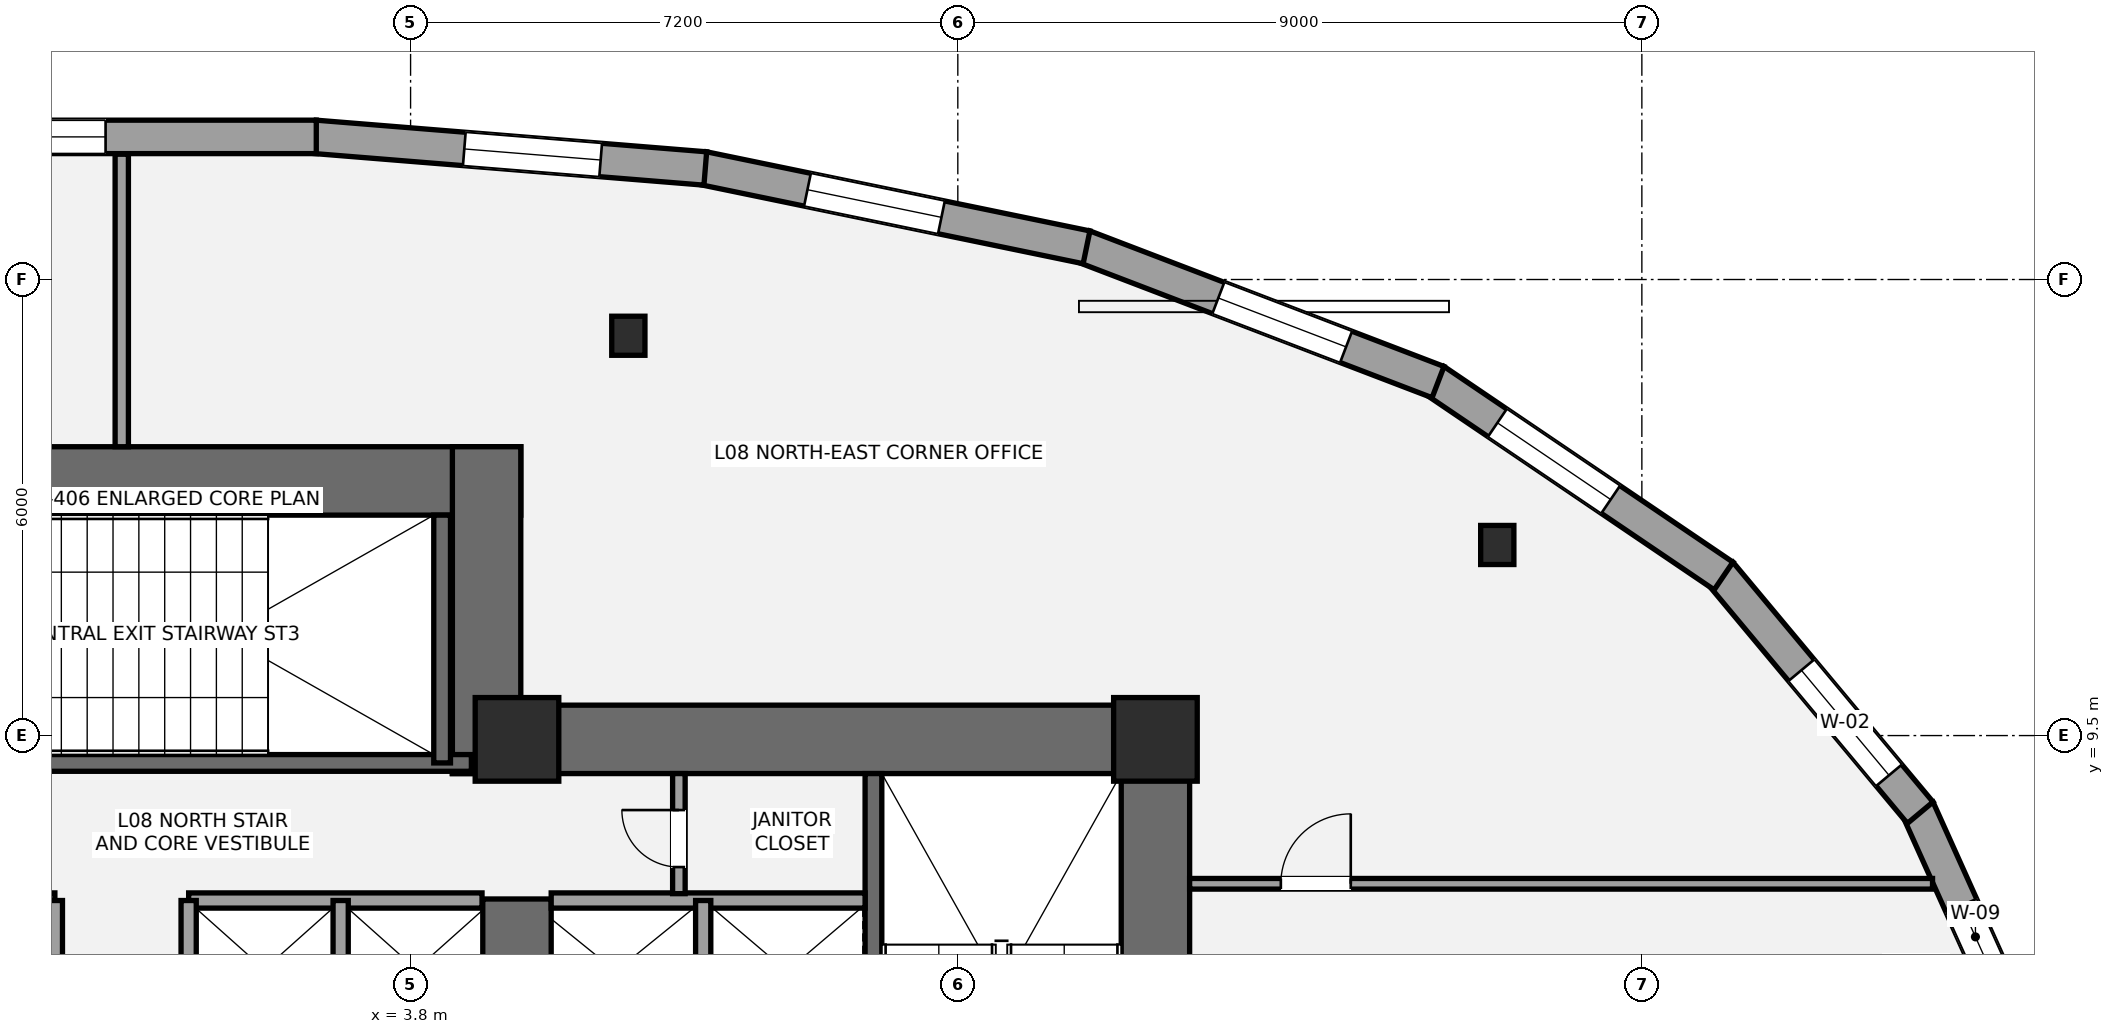
"""IFC4 building model, lengths in metres.
Left out: names, types, materials, properties, quantities, classifications, styles, units other than length and angle.
Written with IfcOpenShell. Run it as: python <this file> out.ifc"""

import sys

from ifc_helpers import new_model, si_unit, direction, frame, frame_2d, origin, origin_2d, place, context, subcontext, project, spatial, rectangle, i_section, extrude, element, fill, save


model = new_model("IFC4")
c1 = context("Model", 3, precision=1e-05, world=origin(), true_north=direction((0.0, 1.0)))
c2 = subcontext(c1, "Body", "Model", "MODEL_VIEW")
j1 = project(units=[si_unit("LENGTHUNIT", "METRE"), si_unit("PLANEANGLEUNIT", "RADIAN")], contexts=[c1])
p1 = place(None, origin())
s1 = spatial("IfcSite", under=j1, at=p1, CompositionType="ELEMENT")
p2 = place(p1, origin())
s2 = spatial("IfcBuilding", under=s1, at=p2, CompositionType="ELEMENT")
p3 = place(p2, frame((0.0, 0.0, 34.2)))
s3 = spatial("IfcBuildingStorey", under=s2, at=p3, CompositionType="ELEMENT", Elevation=34.2)
p4 = place(p3, frame((13.6, 0.95, 0.0), z_axis=(0.0, 0.0, 1.0), x_axis=(0.0, 1.0, 0.0)))
e1 = element("IfcWall", 1, at=p4, inside=s3, PredefinedType="SHEAR", context=c2, shape_type="SweptSolid", body=[
    extrude(rectangle(XDim=8.95, YDim=0.9, at=frame_2d((4.475, 0.0))), origin(), (0.0, 0.0, 1.0), 3.6),
])
p5 = place(p3, frame((4.35, 9.45, 0.0), z_axis=(0.0, 0.0, 1.0), x_axis=(1.0, 0.0, 0.0)))
e2 = element("IfcWall", 2, at=p5, inside=s3, PredefinedType="SHEAR", context=c2, shape_type="SweptSolid", body=[
    extrude(rectangle(XDim=9.7, YDim=0.9, at=frame_2d((4.85, 0.0))), origin(), (0.0, 0.0, 1.0), 3.6),
])
p6 = place(p3, frame((5.2, 5.35, 0.0), z_axis=(0.0, 0.0, 1.0), x_axis=(0.0, 1.0, 0.0)))
e3 = element("IfcWall", 3, at=p6, inside=s3, PredefinedType="SHEAR", context=c2, shape_type="SweptSolid", body=[
    extrude(rectangle(XDim=2.0, YDim=0.9, at=frame_2d((1.0, 0.0))), origin(), (0.0, 0.0, 1.0), 3.6),
])
p7 = place(p3, frame((9.89, 1.85, 0.0), z_axis=(0.0, 0.0, 1.0), x_axis=(0.0, 1.0, 0.0)))
e4 = element("IfcWall", 4, at=p7, inside=s3, PredefinedType="SHEAR", context=c2, shape_type="SweptSolid", body=[
    extrude(rectangle(XDim=7.15, YDim=0.22, at=frame_2d((3.575, 0.0))), origin(), (0.0, 0.0, 1.0), 3.6),
])
p8 = place(p3, frame((-5.25, 12.85, 0.0), z_axis=(0.0, 0.0, 1.0), x_axis=(1.0, 0.0, 0.0)))
e5 = element("IfcWall", 5, at=p8, inside=s3, PredefinedType="SHEAR", context=c2, shape_type="SweptSolid", body=[
    extrude(rectangle(XDim=10.5, YDim=0.9, at=frame_2d((5.25, 0.0))), origin(), (0.0, 0.0, 1.0), 3.6),
])
p9 = place(p3, frame((4.8, 9.0, 0.0), z_axis=(0.0, 0.0, 1.0), x_axis=(0.0, 1.0, 0.0)))
e6 = element("IfcWall", 6, at=p9, inside=s3, PredefinedType="SHEAR", context=c2, shape_type="SweptSolid", body=[
    extrude(rectangle(XDim=4.3, YDim=0.9, at=frame_2d((2.15, 0.0))), origin(), (0.0, 0.0, 1.0), 3.6),
])
p10 = place(p3, frame((-4.7, 9.14, 0.0), z_axis=(0.0, 0.0, 1.0), x_axis=(1.0, 0.0, 0.0)))
e7 = element("IfcWall", 7, at=p10, inside=s3, PredefinedType="SHEAR", context=c2, shape_type="SweptSolid", body=[
    extrude(rectangle(XDim=9.3, YDim=0.22, at=frame_2d((4.65, 0.0))), origin(), (0.0, 0.0, 1.0), 3.6),
])
p11 = place(p10, frame((1.15, 0.0, 0.0)))
e8 = element("IfcOpeningElement", 8, at=p11, cuts=e7, PredefinedType="OPENING", context=c2, shape_type="SweptSolid", body=[
    extrude(rectangle(XDim=1.05, YDim=2.15, at=frame_2d((0.525, 1.075))), frame((0.0, 0.12, 0.0), z_axis=(0.0, -1.0, 0.0), x_axis=(1.0, 0.0, 0.0)), (0.0, 0.0, 1.0), 0.24),
])
p12 = place(p3, frame((4.215, 9.14, 0.0), z_axis=(0.0, 0.0, 1.0), x_axis=(0.0, 1.0, 0.0)))
e9 = element("IfcWall", 9, at=p12, inside=s3, PredefinedType="SHEAR", context=c2, shape_type="SweptSolid", body=[
    extrude(rectangle(XDim=3.26, YDim=0.22, at=frame_2d((1.63, 0.0))), origin(), (0.0, 0.0, 1.0), 3.6),
])
for number, where, z_axis, x_axis in (
    (10, (5.2, 9.45, 0.0), (0.0, 0.0, 1.0), (1.0, 0.0, 0.0)),
    (11, (13.6, 9.45, 0.0), (0.0, 0.0, 1.0), (1.0, 0.0, 0.0)),
):
    element("IfcColumn", number, at=place(p3, frame(where, z_axis=z_axis, x_axis=x_axis)), inside=s3, PredefinedType="COLUMN", context=c2, shape_type="SweptSolid", body=[
        extrude(rectangle(XDim=1.1, YDim=1.1, at=origin_2d()), origin(), (0.0, 0.0, 1.0), 3.6),
    ])
for number, where, z_axis, x_axis in (
    (12, (18.098, 12.007, 0.0), (0.0, 0.0, 1.0), (1.0, 0.0, 0.0)),
    (13, (6.665, 14.76, 0.0), (0.0, 0.0, 1.0), (1.0, 0.0, 0.0)),
):
    element("IfcColumn", number, at=place(p3, frame(where, z_axis=z_axis, x_axis=x_axis)), inside=s3, PredefinedType="COLUMN", context=c2, shape_type="SweptSolid", body=[
        extrude(i_section(OverallWidth=0.437, OverallDepth=0.514, WebThickness=0.061, FlangeThickness=0.097, at=origin_2d()), origin(), (0.0, 0.0, 1.0), 3.6),
    ])
p13 = place(p3, frame((23.631, 8.536, 0.0), z_axis=(0.0, 0.0, 1.0), x_axis=(0.410386362845, -0.911911746383, 0.0)))
e14 = element("IfcWall", 14, at=p13, inside=s3, PredefinedType="STANDARD", context=c2, shape_type="SweptSolid", body=[
    extrude(rectangle(XDim=3.745, YDim=0.44, at=frame_2d((1.873, 0.0))), origin(), (0.0, 0.0, 1.0), 2.533),
])
p14 = place(p13, frame((1.397, 0.0, 0.92)))
e15 = element("IfcOpeningElement", 15, at=p14, cuts=e14, PredefinedType="OPENING", context=c2, shape_type="SweptSolid", body=[
    extrude(rectangle(XDim=0.9, YDim=1.35, at=frame_2d((0.45, 0.675))), frame((0.0, 0.23, 0.0), z_axis=(0.0, -1.0, 0.0), x_axis=(1.0, 0.0, 0.0)), (0.0, 0.0, 1.0), 0.46),
])
p15 = place(p3, frame((21.029, 11.641, 0.0), z_axis=(0.0, 0.0, 1.0), x_axis=(0.64070435578, -0.767787684509, 0.0)))
e16 = element("IfcWall", 16, at=p15, inside=s3, PredefinedType="STANDARD", context=c2, shape_type="SweptSolid", body=[
    extrude(rectangle(XDim=4.109, YDim=0.44, at=frame_2d((2.055, 0.0))), origin(), (0.0, 0.0, 1.0), 2.533),
])
p16 = place(p15, frame((1.669, 0.0, 0.65)))
e17 = element("IfcOpeningElement", 17, at=p16, cuts=e16, PredefinedType="OPENING", context=c2, shape_type="SweptSolid", body=[
    extrude(rectangle(XDim=1.8, YDim=1.7, at=frame_2d((0.9, 0.85))), frame((0.0, 0.23, 0.0), z_axis=(0.0, -1.0, 0.0), x_axis=(1.0, 0.0, 0.0)), (0.0, 0.0, 1.0), 0.46),
])
p17 = place(p3, frame((17.274, 14.174, 0.0), z_axis=(0.0, 0.0, 1.0), x_axis=(0.828003115717, -0.560723497246, 0.0)))
e18 = element("IfcWall", 18, at=p17, inside=s3, PredefinedType="STANDARD", context=c2, shape_type="SweptSolid", body=[
    extrude(rectangle(XDim=4.591, YDim=0.44, at=frame_2d((2.295, 0.0))), origin(), (0.0, 0.0, 1.0), 2.529),
])
p18 = place(p17, frame((0.997, 0.0, 0.65)))
e19 = element("IfcOpeningElement", 19, at=p18, cuts=e18, PredefinedType="OPENING", context=c2, shape_type="SweptSolid", body=[
    extrude(rectangle(XDim=1.8, YDim=1.7, at=frame_2d((0.9, 0.85))), frame((0.0, 0.23, 0.0), z_axis=(0.0, -1.0, 0.0), x_axis=(1.0, 0.0, 0.0)), (0.0, 0.0, 1.0), 0.46),
])
p19 = place(p3, frame((12.659, 15.934, 0.0), z_axis=(0.0, 0.0, 1.0), x_axis=(0.933928375579, -0.357460192592, 0.0)))
e20 = element("IfcWall", 20, at=p19, inside=s3, PredefinedType="STANDARD", context=c2, shape_type="SweptSolid", body=[
    extrude(rectangle(XDim=4.989, YDim=0.44, at=frame_2d((2.494, 0.0))), origin(), (0.0, 0.0, 1.0), 2.529),
])
p20 = place(p19, frame((1.893, 0.0, 0.65)))
e21 = element("IfcOpeningElement", 21, at=p20, cuts=e20, PredefinedType="OPENING", context=c2, shape_type="SweptSolid", body=[
    extrude(rectangle(XDim=1.8, YDim=1.7, at=frame_2d((0.9, 0.85))), frame((0.0, 0.23, 0.0), z_axis=(0.0, -1.0, 0.0), x_axis=(1.0, 0.0, 0.0)), (0.0, 0.0, 1.0), 0.46),
])
p21 = place(p3, frame((7.651, 16.965, 0.0), z_axis=(0.0, 0.0, 1.0), x_axis=(0.979349207435, -0.202175987437, 0.0)))
e22 = element("IfcWall", 22, at=p21, inside=s3, PredefinedType="STANDARD", context=c2, shape_type="SweptSolid", body=[
    extrude(rectangle(XDim=5.149, YDim=0.44, at=frame_2d((2.575, 0.0))), origin(), (0.0, 0.0, 1.0), 2.533),
])
p22 = place(p21, frame((1.4, 0.0, 0.65)))
e23 = element("IfcOpeningElement", 23, at=p22, cuts=e22, PredefinedType="OPENING", context=c2, shape_type="SweptSolid", body=[
    extrude(rectangle(XDim=1.8, YDim=1.7, at=frame_2d((0.9, 0.85))), frame((0.0, 0.23, 0.0), z_axis=(0.0, -1.0, 0.0), x_axis=(1.0, 0.0, 0.0)), (0.0, 0.0, 1.0), 0.46),
])
p23 = place(p3, frame((2.541, 17.377, 0.0), z_axis=(0.0, 0.0, 1.0), x_axis=(0.996732038622, -0.080778977367, 0.0)))
e24 = element("IfcWall", 24, at=p23, inside=s3, PredefinedType="STANDARD", context=c2, shape_type="SweptSolid", body=[
    extrude(rectangle(XDim=5.153, YDim=0.44, at=frame_2d((2.577, 0.0))), origin(), (0.0, 0.0, 1.0), 2.533),
])
p24 = place(p23, frame((1.972, 0.0, 0.65)))
e25 = element("IfcOpeningElement", 25, at=p24, cuts=e24, PredefinedType="OPENING", context=c2, shape_type="SweptSolid", body=[
    extrude(rectangle(XDim=1.8, YDim=1.7, at=frame_2d((0.9, 0.85))), frame((0.0, 0.23, 0.0), z_axis=(0.0, -1.0, 0.0), x_axis=(1.0, 0.0, 0.0)), (0.0, 0.0, 1.0), 0.46),
])
p25 = place(p3, frame((-2.559, 17.376, 0.0), z_axis=(0.0, 0.0, 1.0), x_axis=(1.0, 0.0, 0.0)))
e26 = element("IfcWall", 26, at=p25, inside=s3, PredefinedType="STANDARD", context=c2, shape_type="SweptSolid", body=[
    extrude(rectangle(XDim=5.118, YDim=0.44, at=frame_2d((2.559, 0.0))), origin(), (0.0, 0.0, 1.0), 2.533),
])
p26 = place(p25, frame((0.546, 0.0, 0.65)))
e27 = element("IfcOpeningElement", 27, at=p26, cuts=e26, PredefinedType="OPENING", context=c2, shape_type="SweptSolid", body=[
    extrude(rectangle(XDim=1.8, YDim=1.7, at=frame_2d((0.9, 0.85))), frame((0.0, 0.23, 0.0), z_axis=(0.0, -1.0, 0.0), x_axis=(1.0, 0.0, 0.0)), (0.0, 0.0, 1.0), 0.46),
])
p27 = place(p3, frame((5.65, 7.33, 0.0), z_axis=(0.0, 0.0, 1.0), x_axis=(1.0, 0.0, 0.0)))
e28 = element("IfcWall", 28, at=p27, inside=s3, PredefinedType="SOLIDWALL", context=c2, shape_type="SweptSolid", body=[
    extrude(rectangle(XDim=4.13, YDim=0.2, at=frame_2d((2.065, 0.0))), origin(), (0.0, 0.0, 1.0), 3.4),
])
p28 = place(p3, frame((7.65, 5.47, 0.0), z_axis=(0.0, 0.0, 1.0), x_axis=(0.0, 1.0, 0.0)))
e29 = element("IfcWall", 29, at=p28, inside=s3, PredefinedType="SOLIDWALL", context=c2, shape_type="SweptSolid", body=[
    extrude(rectangle(XDim=1.86, YDim=0.2, at=frame_2d((0.93, 0.0))), origin(), (0.0, 0.0, 1.0), 3.4),
])
for number, where, z_axis, x_axis in (
    (30, (-4.74, 7.33, 0.0), (0.0, 0.0, 1.0), (1.0, 0.0, 0.0)),
    (31, (0.88, 7.33, 0.0), (0.0, 0.0, 1.0), (1.0, 0.0, 0.0)),
):
    element("IfcWall", number, at=place(p3, frame(where, z_axis=z_axis, x_axis=x_axis)), inside=s3, PredefinedType="SOLIDWALL", context=c2, shape_type="SweptSolid", body=[
        extrude(rectangle(XDim=3.86, YDim=0.2, at=frame_2d((1.93, 0.0))), origin(), (0.0, 0.0, 1.0), 3.4),
    ])
for number, where, z_axis, x_axis in (
    (32, (2.88, 5.52, 0.0), (0.0, 0.0, 1.0), (0.0, 1.0, 0.0)),
    (33, (-0.88, 5.52, 0.0), (0.0, 0.0, 1.0), (0.0, 1.0, 0.0)),
    (34, (0.88, 5.52, 0.0), (0.0, 0.0, 1.0), (0.0, 1.0, 0.0)),
):
    element("IfcWall", number, at=place(p3, frame(where, z_axis=z_axis, x_axis=x_axis)), inside=s3, PredefinedType="SOLIDWALL", context=c2, shape_type="SweptSolid", body=[
        extrude(rectangle(XDim=1.81, YDim=0.2, at=frame_2d((0.905, 0.0))), origin(), (0.0, 0.0, 1.0), 3.4),
    ])
p29 = place(p3, frame((7.33, 7.42, 0.0), z_axis=(0.0, 0.0, 1.0), x_axis=(0.0, 1.0, 0.0)))
e35 = element("IfcWall", 35, at=p29, inside=s3, PredefinedType="PARTITIONING", context=c2, shape_type="SweptSolid", body=[
    extrude(rectangle(XDim=1.58, YDim=0.165, at=frame_2d((0.79, 0.0))), origin(), (0.0, 0.0, 1.0), 3.4),
])
p30 = place(p29, frame((0.35, 0.0, 0.0)))
e36 = element("IfcOpeningElement", 36, at=p30, cuts=e35, PredefinedType="OPENING", context=c2, shape_type="SweptSolid", body=[
    extrude(rectangle(XDim=0.75, YDim=2.1, at=frame_2d((0.375, 1.05))), frame((0.0, 0.093, 0.0), z_axis=(0.0, -1.0, 0.0), x_axis=(1.0, 0.0, 0.0)), (0.0, 0.0, 1.0), 0.185),
])
p31 = place(p3, frame((14.05, 7.55, 0.0), z_axis=(0.0, 0.0, 1.0), x_axis=(1.0, 0.0, 0.0)))
e37 = element("IfcWall", 37, at=p31, inside=s3, PredefinedType="PARTITIONING", context=c2, shape_type="SweptSolid", body=[
    extrude(rectangle(XDim=9.774, YDim=0.14, at=frame_2d((4.887, 0.0))), origin(), (0.0, 0.0, 1.0), 2.853),
])
p32 = place(p31, frame((1.2, 0.0, 0.0)))
e38 = element("IfcOpeningElement", 38, at=p32, cuts=e37, PredefinedType="OPENING", context=c2, shape_type="SweptSolid", body=[
    extrude(rectangle(XDim=0.92, YDim=2.15, at=frame_2d((0.46, 1.075))), frame((0.0, 0.08, 0.0), z_axis=(0.0, -1.0, 0.0), x_axis=(1.0, 0.0, 0.0)), (0.0, 0.0, 1.0), 0.16),
])
p33 = place(p3, frame((0.0, 13.3, 0.0), z_axis=(0.0, 0.0, 1.0), x_axis=(0.0, 1.0, 0.0)))
e39 = element("IfcWall", 39, at=p33, inside=s3, PredefinedType="PARTITIONING", context=c2, shape_type="SweptSolid", body=[
    extrude(rectangle(XDim=3.848, YDim=0.175, at=frame_2d((1.924, 0.0))), origin(), (0.0, 0.0, 1.0), 3.4),
])
p34 = place(p14, origin())
e40 = element("IfcWindow", 40, at=p34, inside=s3, PartitioningType="SINGLE_PANEL", PredefinedType="WINDOW", context=c2, shape_type="SweptSolid", body=[
    extrude(rectangle(XDim=0.9, YDim=1.35, at=frame_2d((0.45, 0.675))), frame((0.0, -0.01, 0.0), z_axis=(0.0, -1.0, 0.0), x_axis=(1.0, 0.0, 0.0)), (0.0, 0.0, 1.0), 0.06),
])
fill(e15, e40)
p35 = place(p16, origin())
e41 = element("IfcWindow", 41, at=p35, inside=s3, PartitioningType="SINGLE_PANEL", PredefinedType="WINDOW", context=c2, shape_type="SweptSolid", body=[
    extrude(rectangle(XDim=1.8, YDim=1.7, at=frame_2d((0.9, 0.85))), frame((0.0, -0.01, 0.0), z_axis=(0.0, -1.0, 0.0), x_axis=(1.0, 0.0, 0.0)), (0.0, 0.0, 1.0), 0.06),
])
fill(e17, e41)
p36 = place(p18, origin())
e42 = element("IfcWindow", 42, at=p36, inside=s3, PartitioningType="SINGLE_PANEL", PredefinedType="WINDOW", context=c2, shape_type="SweptSolid", body=[
    extrude(rectangle(XDim=1.8, YDim=1.7, at=frame_2d((0.9, 0.85))), frame((0.0, -0.01, 0.0), z_axis=(0.0, -1.0, 0.0), x_axis=(1.0, 0.0, 0.0)), (0.0, 0.0, 1.0), 0.06),
])
fill(e19, e42)
p37 = place(p20, origin())
e43 = element("IfcWindow", 43, at=p37, inside=s3, PartitioningType="SINGLE_PANEL", PredefinedType="WINDOW", context=c2, shape_type="SweptSolid", body=[
    extrude(rectangle(XDim=1.8, YDim=1.7, at=frame_2d((0.9, 0.85))), frame((0.0, -0.01, 0.0), z_axis=(0.0, -1.0, 0.0), x_axis=(1.0, 0.0, 0.0)), (0.0, 0.0, 1.0), 0.06),
])
fill(e21, e43)
p38 = place(p22, origin())
e44 = element("IfcWindow", 44, at=p38, inside=s3, PartitioningType="SINGLE_PANEL", PredefinedType="WINDOW", context=c2, shape_type="SweptSolid", body=[
    extrude(rectangle(XDim=1.8, YDim=1.7, at=frame_2d((0.9, 0.85))), frame((0.0, -0.01, 0.0), z_axis=(0.0, -1.0, 0.0), x_axis=(1.0, 0.0, 0.0)), (0.0, 0.0, 1.0), 0.06),
])
fill(e23, e44)
p39 = place(p24, origin())
e45 = element("IfcWindow", 45, at=p39, inside=s3, PartitioningType="SINGLE_PANEL", PredefinedType="WINDOW", context=c2, shape_type="SweptSolid", body=[
    extrude(rectangle(XDim=1.8, YDim=1.7, at=frame_2d((0.9, 0.85))), frame((0.0, -0.01, 0.0), z_axis=(0.0, -1.0, 0.0), x_axis=(1.0, 0.0, 0.0)), (0.0, 0.0, 1.0), 0.06),
])
fill(e25, e45)
p40 = place(p26, origin())
e46 = element("IfcWindow", 46, at=p40, inside=s3, PartitioningType="SINGLE_PANEL", PredefinedType="WINDOW", context=c2, shape_type="SweptSolid", body=[
    extrude(rectangle(XDim=1.8, YDim=1.7, at=frame_2d((0.9, 0.85))), frame((0.0, -0.01, 0.0), z_axis=(0.0, -1.0, 0.0), x_axis=(1.0, 0.0, 0.0)), (0.0, 0.0, 1.0), 0.06),
])
fill(e27, e46)
p41 = place(p30, origin())
e47 = element("IfcDoor", 47, at=p41, inside=s3, OperationType="SINGLE_SWING_RIGHT", PredefinedType="DOOR", context=c2, shape_type="SweptSolid", body=[
    extrude(rectangle(XDim=0.75, YDim=2.1, at=frame_2d((0.375, 1.05))), frame((0.0, 0.025, 0.0), z_axis=(0.0, -1.0, 0.0), x_axis=(1.0, 0.0, 0.0)), (0.0, 0.0, 1.0), 0.05),
])
fill(e36, e47)
p42 = place(p32, origin())
e48 = element("IfcDoor", 48, at=p42, inside=s3, OperationType="SINGLE_SWING_RIGHT", PredefinedType="DOOR", context=c2, shape_type="SweptSolid", body=[
    extrude(rectangle(XDim=0.92, YDim=2.15, at=frame_2d((0.46, 1.075))), frame((0.0, 0.025, 0.0), z_axis=(0.0, -1.0, 0.0), x_axis=(1.0, 0.0, 0.0)), (0.0, 0.0, 1.0), 0.05),
])
fill(e38, e48)
save(model, sys.argv[1])
